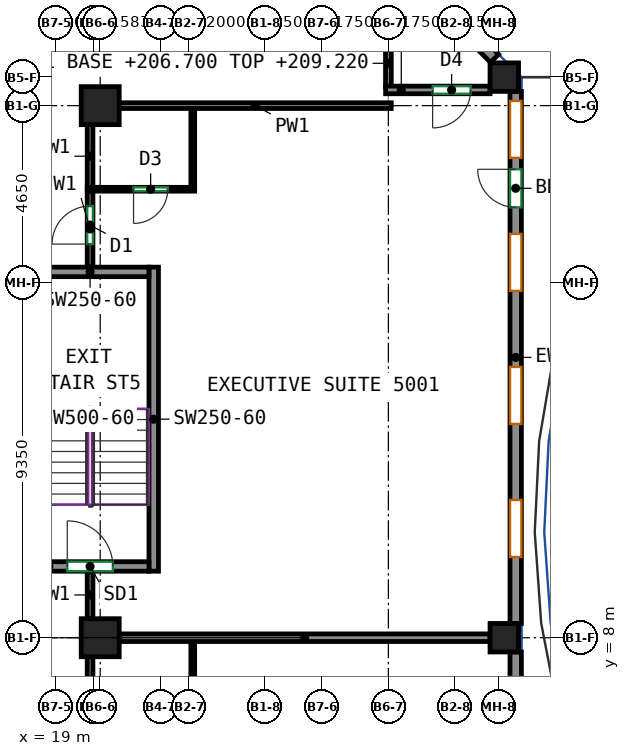
"""IFC4 building model, lengths in metres.
Left out: names, types, materials, properties, quantities, classifications, styles, units other than length and angle.
Written with IfcOpenShell. Run it as: python <this file> out.ifc"""

import sys

from ifc_helpers import new_model, si_unit, direction, frame, frame_2d, origin, origin_2d, place, context, subcontext, project, spatial, rectangle, extrude, source, transform, mapped, element, fill, save


model = new_model("IFC4")
c1 = context("Model", 3, precision=1e-05, world=origin(), true_north=direction((0.0, 1.0)))
c2 = subcontext(c1, "Body", "Model", "MODEL_VIEW")
j1 = project(units=[si_unit("LENGTHUNIT", "METRE"), si_unit("PLANEANGLEUNIT", "RADIAN")], contexts=[c1])
p1 = place(None, origin())
s1 = spatial("IfcSite", under=j1, at=p1, CompositionType="ELEMENT")
p2 = place(p1, origin())
s2 = spatial("IfcBuilding", under=s1, at=p2, CompositionType="ELEMENT")
p3 = place(p2, frame((0.0, 0.0, 206.7)))
s3 = spatial("IfcBuildingStorey", under=s2, at=p3, CompositionType="ELEMENT", Elevation=206.7)
m1 = source(origin(), c2, "Body", "SweptSolid", [
    extrude(rectangle(XDim=1.0, YDim=1.0, at=origin_2d()), origin(), (0.0, 0.0, 1.0), 3.12),
])
for number, where, z_axis, x_axis in (
    (1, (20.167, 8.0, 0.0), (0.0, 0.0, 1.0), (1.0, 0.0, 0.0)),
    (2, (20.167, 22.0, 0.0), (0.0, 0.0, 1.0), (1.0, 0.0, 0.0)),
):
    element("IfcColumn", number, at=place(p3, frame(where, z_axis=z_axis, x_axis=x_axis)), inside=s3, PredefinedType="COLUMN", context=c2, shape_type="MappedRepresentation", body=[
        mapped(m1, transform((0.0, 0.0, 0.0))),
    ])
m2 = source(origin(), c2, "Body", "SweptSolid", [
    extrude(rectangle(XDim=0.75, YDim=0.75, at=origin_2d()), origin(), (0.0, 0.0, 1.0), 3.12),
])
for number, where, z_axis, x_axis in (
    (3, (30.8, 8.0, 0.0), (0.0, 0.0, 1.0), (1.0, 0.0, 0.0)),
    (4, (30.8, 22.75, 0.0), (0.0, 0.0, 1.0), (1.0, 0.0, 0.0)),
):
    element("IfcColumn", number, at=place(p3, frame(where, z_axis=z_axis, x_axis=x_axis)), inside=s3, PredefinedType="COLUMN", context=c2, shape_type="MappedRepresentation", body=[
        mapped(m2, transform((0.0, 0.0, 0.0))),
    ])
m3 = source(origin(), c2, "Body", "SweptSolid", [
    extrude(rectangle(XDim=8.0, YDim=0.25, at=frame_2d((4.0, 0.0))), origin(), (0.0, 0.0, 1.0), 3.12),
])
p4 = place(p3, frame((21.575, 9.75, 0.0), z_axis=(0.0, 0.0, 1.0), x_axis=(0.0, 1.0, 0.0)))
e5 = element("IfcWall", 5, at=p4, inside=s3, PredefinedType="SHEAR", context=c2, shape_type="MappedRepresentation", body=[
    mapped(m3, transform((0.0, 0.0, 0.0))),
])
m4 = source(origin(), c2, "Body", "SweptSolid", [
    extrude(rectangle(XDim=3.1, YDim=0.25, at=frame_2d((1.55, 0.0))), origin(), (0.0, 0.0, 1.0), 3.12),
])
p5 = place(p3, frame((18.35, 9.875, 0.0), z_axis=(0.0, 0.0, 1.0), x_axis=(1.0, 0.0, 0.0)))
e6 = element("IfcWall", 6, at=p5, inside=s3, PredefinedType="SHEAR", context=c2, shape_type="MappedRepresentation", body=[
    mapped(m4, transform((0.0, 0.0, 0.0))),
])
p6 = place(p5, frame((0.95, 0.0, 0.0)))
e7 = element("IfcOpeningElement", 7, at=p6, cuts=e6, PredefinedType="OPENING", context=c2, shape_type="SweptSolid", body=[
    extrude(rectangle(XDim=1.2, YDim=2.1, at=frame_2d((0.6, 1.05))), frame((0.0, 0.135, 0.0), z_axis=(0.0, -1.0, 0.0), x_axis=(1.0, 0.0, 0.0)), (0.0, 0.0, 1.0), 0.27),
])
p7 = place(p3, frame((18.35, 17.625, 0.0), z_axis=(0.0, 0.0, 1.0), x_axis=(1.0, 0.0, 0.0)))
e8 = element("IfcWall", 8, at=p7, inside=s3, PredefinedType="SHEAR", context=c2, shape_type="MappedRepresentation", body=[
    mapped(m4, transform((0.0, 0.0, 0.0))),
])
m5 = source(origin(), c2, "Body", "SweptSolid", [
    extrude(rectangle(XDim=7.812, YDim=0.3, at=frame_2d((3.906, 0.0))), origin(), (0.0, 0.0, 1.0), 3.12),
])
p8 = place(p3, frame((31.1, -0.188, 0.0), z_axis=(0.0, 0.0, 1.0), x_axis=(0.0, 1.0, 0.0)))
e9 = element("IfcWall", 9, at=p8, inside=s3, PredefinedType="SOLIDWALL", context=c2, shape_type="MappedRepresentation", body=[
    mapped(m5, transform((0.0, 0.0, 0.0))),
])
p9 = place(p8, frame((1.75, 0.0, 0.85)))
e10 = element("IfcOpeningElement", 10, at=p9, cuts=e9, PredefinedType="OPENING", context=c2, shape_type="SweptSolid", body=[
    extrude(rectangle(XDim=1.5, YDim=1.95, at=frame_2d((0.75, 0.975))), frame((0.0, 0.16, 0.0), z_axis=(0.0, -1.0, 0.0), x_axis=(1.0, 0.0, 0.0)), (0.0, 0.0, 1.0), 0.32),
])
p10 = place(p8, frame((0.45, 0.0, 0.0)))
e11 = element("IfcOpeningElement", 11, at=p10, cuts=e9, PredefinedType="OPENING", context=c2, shape_type="SweptSolid", body=[
    extrude(rectangle(XDim=1.0, YDim=2.1, at=frame_2d((0.5, 1.05))), frame((0.0, 0.16, 0.0), z_axis=(0.0, -1.0, 0.0), x_axis=(1.0, 0.0, 0.0)), (0.0, 0.0, 1.0), 0.32),
])
p11 = place(p8, frame((5.656, 0.0, 0.85)))
e12 = element("IfcOpeningElement", 12, at=p11, cuts=e9, PredefinedType="OPENING", context=c2, shape_type="SweptSolid", body=[
    extrude(rectangle(XDim=1.5, YDim=1.95, at=frame_2d((0.75, 0.975))), frame((0.0, 0.16, 0.0), z_axis=(0.0, -1.0, 0.0), x_axis=(1.0, 0.0, 0.0)), (0.0, 0.0, 1.0), 0.32),
])
p12 = place(p8, frame((4.356, 0.0, 0.0)))
e13 = element("IfcOpeningElement", 13, at=p12, cuts=e9, PredefinedType="OPENING", context=c2, shape_type="SweptSolid", body=[
    extrude(rectangle(XDim=1.0, YDim=2.1, at=frame_2d((0.5, 1.05))), frame((0.0, 0.16, 0.0), z_axis=(0.0, -1.0, 0.0), x_axis=(1.0, 0.0, 0.0)), (0.0, 0.0, 1.0), 0.32),
])
m6 = source(origin(), c2, "Body", "SweptSolid", [
    extrude(rectangle(XDim=14.0, YDim=0.3, at=frame_2d((7.0, 0.0))), origin(), (0.0, 0.0, 1.0), 3.12),
])
p13 = place(p3, frame((31.1, 8.375, 0.0), z_axis=(0.0, 0.0, 1.0), x_axis=(0.0, 1.0, 0.0)))
e14 = element("IfcWall", 14, at=p13, inside=s3, PredefinedType="SOLIDWALL", context=c2, shape_type="MappedRepresentation", body=[
    mapped(m6, transform((0.0, 0.0, 0.0))),
])
p14 = place(p13, frame((1.75, 0.0, 0.85)))
e15 = element("IfcOpeningElement", 15, at=p14, cuts=e14, PredefinedType="OPENING", context=c2, shape_type="SweptSolid", body=[
    extrude(rectangle(XDim=1.5, YDim=1.95, at=frame_2d((0.75, 0.975))), frame((0.0, 0.16, 0.0), z_axis=(0.0, -1.0, 0.0), x_axis=(1.0, 0.0, 0.0)), (0.0, 0.0, 1.0), 0.32),
])
p15 = place(p13, frame((5.25, 0.0, 0.85)))
e16 = element("IfcOpeningElement", 16, at=p15, cuts=e14, PredefinedType="OPENING", context=c2, shape_type="SweptSolid", body=[
    extrude(rectangle(XDim=1.5, YDim=1.95, at=frame_2d((0.75, 0.975))), frame((0.0, 0.16, 0.0), z_axis=(0.0, -1.0, 0.0), x_axis=(1.0, 0.0, 0.0)), (0.0, 0.0, 1.0), 0.32),
])
p16 = place(p13, frame((8.75, 0.0, 0.85)))
e17 = element("IfcOpeningElement", 17, at=p16, cuts=e14, PredefinedType="OPENING", context=c2, shape_type="SweptSolid", body=[
    extrude(rectangle(XDim=1.5, YDim=1.95, at=frame_2d((0.75, 0.975))), frame((0.0, 0.16, 0.0), z_axis=(0.0, -1.0, 0.0), x_axis=(1.0, 0.0, 0.0)), (0.0, 0.0, 1.0), 0.32),
])
p17 = place(p13, frame((12.25, 0.0, 0.85)))
e18 = element("IfcOpeningElement", 18, at=p17, cuts=e14, PredefinedType="OPENING", context=c2, shape_type="SweptSolid", body=[
    extrude(rectangle(XDim=1.5, YDim=1.95, at=frame_2d((0.75, 0.975))), frame((0.0, 0.16, 0.0), z_axis=(0.0, -1.0, 0.0), x_axis=(1.0, 0.0, 0.0)), (0.0, 0.0, 1.0), 0.32),
])
p18 = place(p13, frame((10.95, 0.0, 0.0)))
e19 = element("IfcOpeningElement", 19, at=p18, cuts=e14, PredefinedType="OPENING", context=c2, shape_type="SweptSolid", body=[
    extrude(rectangle(XDim=1.0, YDim=2.1, at=frame_2d((0.5, 1.05))), frame((0.0, 0.16, 0.0), z_axis=(0.0, -1.0, 0.0), x_axis=(1.0, 0.0, 0.0)), (0.0, 0.0, 1.0), 0.32),
])
m7 = source(origin(), c2, "Body", "SweptSolid", [
    extrude(rectangle(XDim=3.571, YDim=0.3, at=frame_2d((1.786, 0.0))), origin(), (0.0, 0.0, 1.0), 3.12),
])
p19 = place(p3, frame((30.544, 23.244, 0.0), z_axis=(0.0, 0.0, 1.0), x_axis=(-0.707140964879, 0.707072595841, 0.0)))
e20 = element("IfcWall", 20, at=p19, inside=s3, PredefinedType="SOLIDWALL", context=c2, shape_type="MappedRepresentation", body=[
    mapped(m7, transform((0.0, 0.0, 0.0))),
])
p20 = place(p19, frame((0.686, 0.0, 0.85)))
e21 = element("IfcOpeningElement", 21, at=p20, cuts=e20, PredefinedType="OPENING", context=c2, shape_type="SweptSolid", body=[
    extrude(rectangle(XDim=2.2, YDim=1.95, at=frame_2d((1.1, 0.975))), frame((0.0, 0.16, 0.0), z_axis=(0.0, -1.0, 0.0), x_axis=(1.0, 0.0, 0.0)), (0.0, 0.0, 1.0), 0.32),
])
p21 = place(p3, frame((19.9, 5.84, 0.0), z_axis=(0.0, 0.0, 1.0), x_axis=(0.0, 1.0, 0.0)))
e22 = element("IfcWall", 22, at=p21, inside=s3, PredefinedType="PARTITIONING", context=c2, shape_type="SweptSolid", body=[
    extrude(rectangle(XDim=1.66, YDim=0.15, at=frame_2d((0.83, 0.0))), origin(), (0.0, 0.0, 1.0), 2.52),
])
p22 = place(p3, frame((19.9, 17.75, 0.0), z_axis=(0.0, 0.0, 1.0), x_axis=(0.0, 1.0, 0.0)))
e23 = element("IfcWall", 23, at=p22, inside=s3, PredefinedType="PARTITIONING", context=c2, shape_type="SweptSolid", body=[
    extrude(rectangle(XDim=2.01, YDim=0.15, at=frame_2d((1.005, 0.0))), origin(), (0.0, 0.0, 1.0), 3.12),
])
p23 = place(p22, frame((0.607, 0.0, 0.0)))
e24 = element("IfcOpeningElement", 24, at=p23, cuts=e23, PredefinedType="OPENING", context=c2, shape_type="SweptSolid", body=[
    extrude(rectangle(XDim=1.0, YDim=2.1, at=frame_2d((0.5, 1.05))), frame((0.0, 0.085, 0.0), z_axis=(0.0, -1.0, 0.0), x_axis=(1.0, 0.0, 0.0)), (0.0, 0.0, 1.0), 0.17),
])
p24 = place(p3, frame((19.9, 8.5, 0.0), z_axis=(0.0, 0.0, 1.0), x_axis=(0.0, 1.0, 0.0)))
e25 = element("IfcWall", 25, at=p24, inside=s3, PredefinedType="PARTITIONING", context=c2, shape_type="SweptSolid", body=[
    extrude(rectangle(XDim=1.25, YDim=0.15, at=frame_2d((0.625, 0.0))), origin(), (0.0, 0.0, 1.0), 3.12),
])
p25 = place(p3, frame((20.667, 22.0, 0.0), z_axis=(0.0, 0.0, 1.0), x_axis=(1.0, 0.0, 0.0)))
e26 = element("IfcWall", 26, at=p25, inside=s3, PredefinedType="PARTITIONING", context=c2, shape_type="SweptSolid", body=[
    extrude(rectangle(XDim=7.158, YDim=0.15, at=frame_2d((3.579, 0.0))), origin(), (0.0, 0.0, 1.0), 3.12),
])
p26 = place(p3, frame((19.9, 19.84, 0.0), z_axis=(0.0, 0.0, 1.0), x_axis=(0.0, 1.0, 0.0)))
e27 = element("IfcWall", 27, at=p26, inside=s3, PredefinedType="PARTITIONING", context=c2, shape_type="SweptSolid", body=[
    extrude(rectangle(XDim=1.66, YDim=0.15, at=frame_2d((0.83, 0.0))), origin(), (0.0, 0.0, 1.0), 3.12),
])
p27 = place(p3, frame((27.75, 22.503, 0.0), z_axis=(0.0, 0.0, 1.0), x_axis=(0.0, 1.0, 0.0)))
e28 = element("IfcWall", 28, at=p27, inside=s3, PredefinedType="PARTITIONING", context=c2, shape_type="SweptSolid", body=[
    extrude(rectangle(XDim=1.222, YDim=0.15, at=frame_2d((0.611, 0.0))), origin(), (0.0, 0.0, 1.0), 2.52),
])
p28 = place(p3, frame((22.602, 5.85, 0.0), z_axis=(0.0, 0.0, 1.0), x_axis=(0.0, 1.0, 0.0)))
e29 = element("IfcWall", 29, at=p28, inside=s3, PredefinedType="PARTITIONING", context=c2, shape_type="SweptSolid", body=[
    extrude(rectangle(XDim=2.05, YDim=0.1, at=frame_2d((1.025, 0.0))), origin(), (0.0, 0.0, 1.0), 3.12),
])
p29 = place(p3, frame((20.667, 8.0, 0.0), z_axis=(0.0, 0.0, 1.0), x_axis=(1.0, 0.0, 0.0)))
e30 = element("IfcWall", 30, at=p29, inside=s3, PredefinedType="PARTITIONING", context=c2, shape_type="SweptSolid", body=[
    extrude(rectangle(XDim=9.758, YDim=0.2, at=frame_2d((4.879, 0.0))), origin(), (0.0, 0.0, 1.0), 2.52),
])
p30 = place(p3, frame((22.652, 19.8, 0.0), z_axis=(0.0, 0.0, 1.0), x_axis=(-1.0, 0.0, 0.0)))
e31 = element("IfcWall", 31, at=p30, inside=s3, PredefinedType="PARTITIONING", context=c2, shape_type="SweptSolid", body=[
    extrude(rectangle(XDim=2.825, YDim=0.1, at=frame_2d((1.413, 0.0))), origin(), (0.0, 0.0, 1.0), 3.12),
])
p31 = place(p30, frame((0.708, 0.0, 0.0)))
e32 = element("IfcOpeningElement", 32, at=p31, cuts=e31, PredefinedType="OPENING", context=c2, shape_type="SweptSolid", body=[
    extrude(rectangle(XDim=0.9, YDim=2.1, at=frame_2d((0.45, 1.05))), frame((0.0, 0.06, 0.0), z_axis=(0.0, -1.0, 0.0), x_axis=(1.0, 0.0, 0.0)), (0.0, 0.0, 1.0), 0.12),
])
p32 = place(p3, frame((22.602, 19.85, 0.0), z_axis=(0.0, 0.0, 1.0), x_axis=(0.0, 1.0, 0.0)))
e33 = element("IfcWall", 33, at=p32, inside=s3, PredefinedType="PARTITIONING", context=c2, shape_type="SweptSolid", body=[
    extrude(rectangle(XDim=2.073, YDim=0.1, at=frame_2d((1.037, 0.0))), origin(), (0.0, 0.0, 1.0), 3.12),
])
p33 = place(p3, frame((30.425, 22.413, 0.0), z_axis=(0.0, 0.0, 1.0), x_axis=(-1.0, 0.0, 0.0)))
e34 = element("IfcWall", 34, at=p33, inside=s3, PredefinedType="PARTITIONING", context=c2, shape_type="SweptSolid", body=[
    extrude(rectangle(XDim=2.748, YDim=0.2, at=frame_2d((1.374, 0.0))), origin(), (0.0, 0.0, 1.0), 2.52),
])
p34 = place(p33, frame((0.511, 0.0, 0.0)))
e35 = element("IfcOpeningElement", 35, at=p34, cuts=e34, PredefinedType="OPENING", context=c2, shape_type="SweptSolid", body=[
    extrude(rectangle(XDim=1.0, YDim=2.1, at=frame_2d((0.5, 1.05))), frame((0.0, 0.11, 0.0), z_axis=(0.0, -1.0, 0.0), x_axis=(1.0, 0.0, 0.0)), (0.0, 0.0, 1.0), 0.22),
])
p35 = place(p14, origin())
e36 = element("IfcWindow", 36, at=p35, inside=s3, PartitioningType="SINGLE_PANEL", PredefinedType="WINDOW", context=c2, shape_type="SweptSolid", body=[
    extrude(rectangle(XDim=1.5, YDim=1.95, at=frame_2d((0.75, 0.975))), frame((0.0, 0.03, 0.0), z_axis=(0.0, -1.0, 0.0), x_axis=(1.0, 0.0, 0.0)), (0.0, 0.0, 1.0), 0.06),
])
fill(e15, e36)
p36 = place(p15, origin())
e37 = element("IfcWindow", 37, at=p36, inside=s3, PartitioningType="SINGLE_PANEL", PredefinedType="WINDOW", context=c2, shape_type="SweptSolid", body=[
    extrude(rectangle(XDim=1.5, YDim=1.95, at=frame_2d((0.75, 0.975))), frame((0.0, 0.03, 0.0), z_axis=(0.0, -1.0, 0.0), x_axis=(1.0, 0.0, 0.0)), (0.0, 0.0, 1.0), 0.06),
])
fill(e16, e37)
p37 = place(p16, origin())
e38 = element("IfcWindow", 38, at=p37, inside=s3, PartitioningType="SINGLE_PANEL", PredefinedType="WINDOW", context=c2, shape_type="SweptSolid", body=[
    extrude(rectangle(XDim=1.5, YDim=1.95, at=frame_2d((0.75, 0.975))), frame((0.0, 0.03, 0.0), z_axis=(0.0, -1.0, 0.0), x_axis=(1.0, 0.0, 0.0)), (0.0, 0.0, 1.0), 0.06),
])
fill(e17, e38)
p38 = place(p17, origin())
e39 = element("IfcWindow", 39, at=p38, inside=s3, PartitioningType="SINGLE_PANEL", PredefinedType="WINDOW", context=c2, shape_type="SweptSolid", body=[
    extrude(rectangle(XDim=1.5, YDim=1.95, at=frame_2d((0.75, 0.975))), frame((0.0, 0.03, 0.0), z_axis=(0.0, -1.0, 0.0), x_axis=(1.0, 0.0, 0.0)), (0.0, 0.0, 1.0), 0.06),
])
fill(e18, e39)
p39 = place(p18, origin())
e40 = element("IfcDoor", 40, at=p39, inside=s3, OperationType="SINGLE_SWING_RIGHT", PredefinedType="DOOR", context=c2, shape_type="SweptSolid", body=[
    extrude(rectangle(XDim=1.0, YDim=2.1, at=frame_2d((0.5, 1.05))), frame((0.0, 0.025, 0.0), z_axis=(0.0, -1.0, 0.0), x_axis=(1.0, 0.0, 0.0)), (0.0, 0.0, 1.0), 0.05),
])
fill(e19, e40)
p40 = place(p6, origin())
e41 = element("IfcDoor", 41, at=p40, inside=s3, OperationType="DOUBLE_DOOR_SINGLE_SWING", PredefinedType="DOOR", context=c2, shape_type="SweptSolid", body=[
    extrude(rectangle(XDim=1.2, YDim=2.1, at=frame_2d((0.6, 1.05))), frame((0.0, 0.025, 0.0), z_axis=(0.0, -1.0, 0.0), x_axis=(1.0, 0.0, 0.0)), (0.0, 0.0, 1.0), 0.05),
])
fill(e7, e41)
p41 = place(p23, origin())
e42 = element("IfcDoor", 42, at=p41, inside=s3, OperationType="SINGLE_SWING_LEFT", PredefinedType="DOOR", context=c2, shape_type="SweptSolid", body=[
    extrude(rectangle(XDim=1.0, YDim=2.1, at=frame_2d((0.5, 1.05))), frame((0.0, 0.025, 0.0), z_axis=(0.0, -1.0, 0.0), x_axis=(1.0, 0.0, 0.0)), (0.0, 0.0, 1.0), 0.05),
])
fill(e24, e42)
p42 = place(p31, origin())
e43 = element("IfcDoor", 43, at=p42, inside=s3, OperationType="SINGLE_SWING_RIGHT", PredefinedType="DOOR", context=c2, shape_type="SweptSolid", body=[
    extrude(rectangle(XDim=0.9, YDim=2.1, at=frame_2d((0.45, 1.05))), frame((0.0, 0.025, 0.0), z_axis=(0.0, -1.0, 0.0), x_axis=(1.0, 0.0, 0.0)), (0.0, 0.0, 1.0), 0.05),
])
fill(e32, e43)
p43 = place(p34, origin())
e44 = element("IfcDoor", 44, at=p43, inside=s3, OperationType="SINGLE_SWING_RIGHT", PredefinedType="DOOR", context=c2, shape_type="SweptSolid", body=[
    extrude(rectangle(XDim=1.0, YDim=2.1, at=frame_2d((0.5, 1.05))), frame((0.0, 0.025, 0.0), z_axis=(0.0, -1.0, 0.0), x_axis=(1.0, 0.0, 0.0)), (0.0, 0.0, 1.0), 0.05),
])
fill(e35, e44)
save(model, sys.argv[1])
